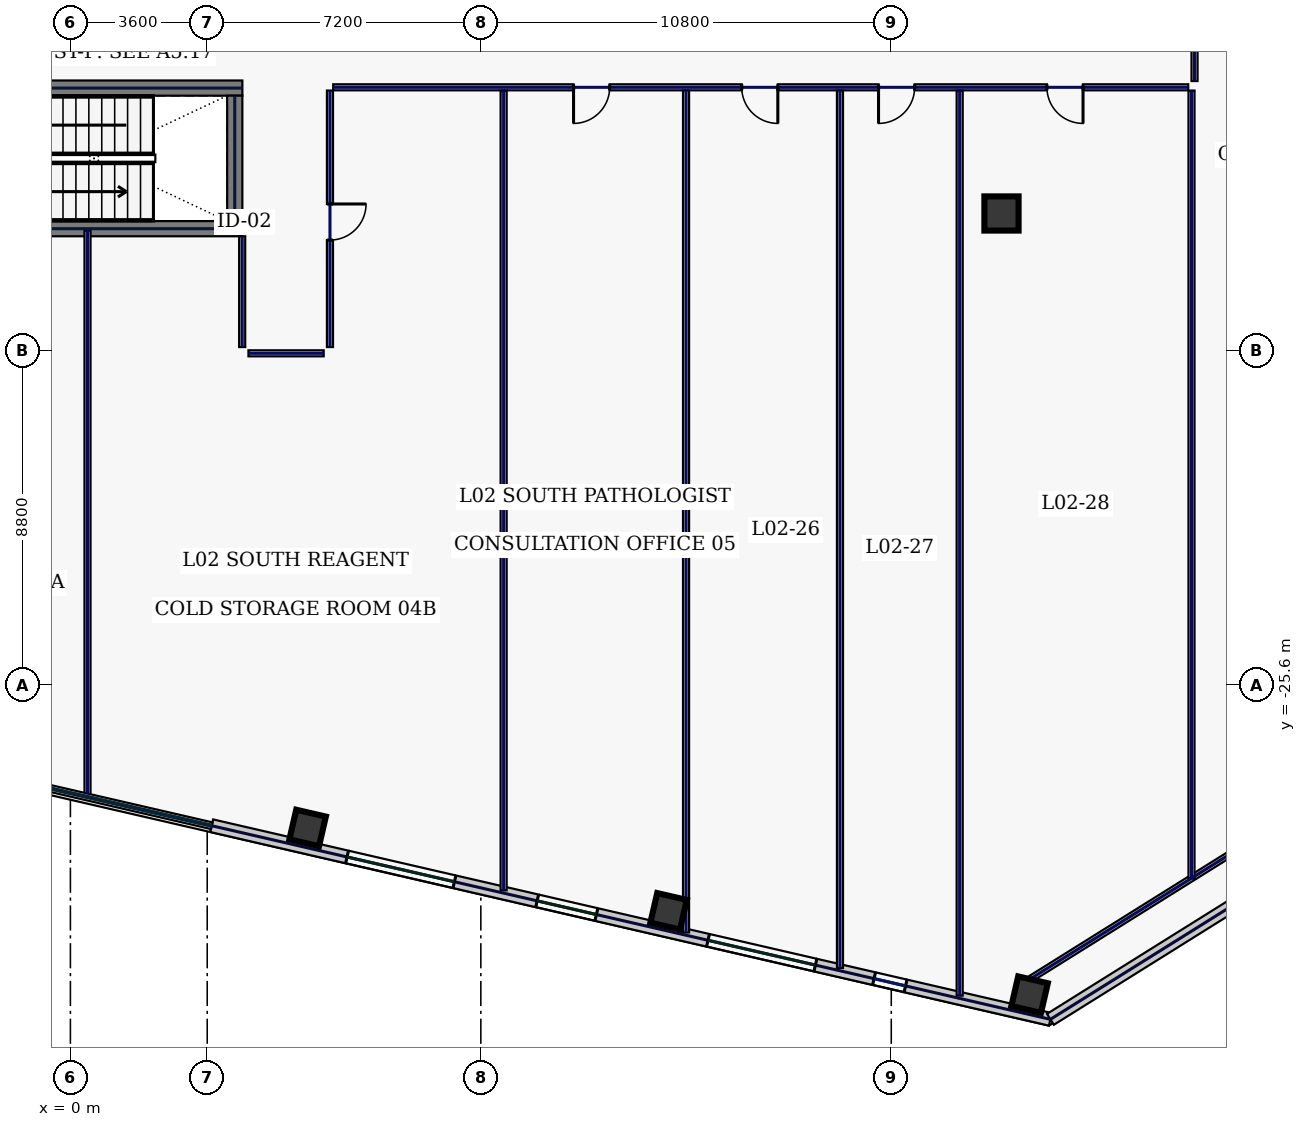
"""IFC4 building model, lengths in metres.
Left out: names, types, materials, properties, quantities, classifications, styles, units other than length and angle.
Written with IfcOpenShell. Run it as: python <this file> out.ifc"""

import sys

from ifc_helpers import new_model, si_unit, direction, frame, frame_2d, origin, origin_2d, place, context, subcontext, project, spatial, rectangle, hollow_rectangle, extrude, element, fill, save


model = new_model("IFC4")
c1 = context("Model", 3, precision=1e-05, world=origin(), true_north=direction((0.0, 1.0)))
c2 = subcontext(c1, "Body", "Model", "MODEL_VIEW")
j1 = project(units=[si_unit("LENGTHUNIT", "METRE"), si_unit("PLANEANGLEUNIT", "RADIAN")], contexts=[c1])
p1 = place(None, origin())
s1 = spatial("IfcSite", under=j1, at=p1, CompositionType="ELEMENT")
p2 = place(p1, origin())
s2 = spatial("IfcBuilding", under=s1, at=p2, CompositionType="ELEMENT")
p3 = place(p2, frame((0.0, 0.0, 13.4)))
s3 = spatial("IfcBuildingStorey", under=s2, at=p3, CompositionType="ELEMENT", Elevation=13.4)
p4 = place(p3, frame((-4.525, -13.6, 0.0), z_axis=(0.0, 0.0, 1.0), x_axis=(1.0, 0.0, 0.0)))
e1 = element("IfcWall", 1, at=p4, inside=s3, PredefinedType="SHEAR", context=c2, shape_type="SweptSolid", body=[
    extrude(rectangle(XDim=9.05, YDim=0.4, at=frame_2d((4.525, 0.0))), origin(), (0.0, 0.0, 1.0), 4.7),
])
p5 = place(p3, frame((-4.525, -9.9, 0.0), z_axis=(0.0, 0.0, 1.0), x_axis=(1.0, 0.0, 0.0)))
e2 = element("IfcWall", 2, at=p5, inside=s3, PredefinedType="SHEAR", context=c2, shape_type="SweptSolid", body=[
    extrude(rectangle(XDim=9.05, YDim=0.4, at=frame_2d((4.525, 0.0))), origin(), (0.0, 0.0, 1.0), 4.7),
])
p6 = place(p5, frame((0.25, 0.0, 0.0)))
e3 = element("IfcOpeningElement", 3, at=p6, cuts=e2, PredefinedType="OPENING", context=c2, shape_type="SweptSolid", body=[
    extrude(rectangle(XDim=1.1, YDim=2.2, at=frame_2d((0.55, 1.1))), frame((0.0, 0.21, 0.0), z_axis=(0.0, -1.0, 0.0), x_axis=(1.0, 0.0, 0.0)), (0.0, 0.0, 1.0), 0.42),
])
p7 = place(p3, frame((4.325, -13.4, 0.0), z_axis=(0.0, 0.0, 1.0), x_axis=(0.0, 1.0, 0.0)))
e4 = element("IfcWall", 4, at=p7, inside=s3, PredefinedType="SHEAR", context=c2, shape_type="SweptSolid", body=[
    extrude(rectangle(XDim=3.3, YDim=0.4, at=frame_2d((1.65, 0.0))), origin(), (0.0, 0.0, 1.0), 4.7),
])
p8 = place(p3, frame((24.5, -13.2, 0.0), z_axis=(0.0, 0.0, 1.0), x_axis=(1.0, 0.0, 0.0)))
e5 = element("IfcColumn", 5, at=p8, inside=s3, PredefinedType="COLUMN", context=c2, shape_type="SweptSolid", body=[
    extrude(hollow_rectangle(XDim=0.9, YDim=0.9, WallThickness=0.04, at=origin_2d()), origin(), (0.0, 0.0, 1.0), 4.7),
])
for number, where, z_axis, x_axis in (
    (6, (6.242, -29.371, 0.0), (0.0, 0.0, 1.0), (0.974, -0.225, 0.0)),
    (7, (15.741, -31.564, 0.0), (0.0, 0.0, 1.0), (0.974, -0.225, 0.0)),
    (8, (25.24, -33.757, 0.0), (0.0, 0.0, 1.0), (0.974, -0.225, 0.0)),
):
    element("IfcColumn", number, at=place(p3, frame(where, z_axis=z_axis, x_axis=x_axis)), inside=s3, PredefinedType="COLUMN", context=c2, shape_type="SweptSolid", body=[
        extrude(hollow_rectangle(XDim=0.8, YDim=0.8, WallThickness=0.036, at=origin_2d()), origin(), (0.0, 0.0, 1.0), 4.7),
    ])
p9 = place(p3, frame((3.717, -29.311, 0.0), z_axis=(0.0, 0.0, 1.0), x_axis=(0.97436993772, -0.224951604723, 0.0)))
e9 = element("IfcWall", 9, at=p9, inside=s3, PredefinedType="STANDARD", context=c2, shape_type="SweptSolid", body=[
    extrude(rectangle(XDim=22.651, YDim=0.34, at=frame_2d((11.326, 0.0))), origin(), (0.0, 0.0, 1.0), 4.7),
])
p10 = place(p9, frame((3.656, 0.0, 0.85)))
e10 = element("IfcOpeningElement", 10, at=p10, cuts=e9, PredefinedType="OPENING", context=c2, shape_type="SweptSolid", body=[
    extrude(rectangle(XDim=2.9, YDim=2.3, at=frame_2d((1.45, 1.15))), frame((0.0, 0.18, 0.0), z_axis=(0.0, -1.0, 0.0), x_axis=(1.0, 0.0, 0.0)), (0.0, 0.0, 1.0), 0.36),
])
p11 = place(p9, frame((8.791, 0.0, 0.22)))
e11 = element("IfcOpeningElement", 11, at=p11, cuts=e9, PredefinedType="OPENING", context=c2, shape_type="SweptSolid", body=[
    extrude(rectangle(XDim=1.6, YDim=1.2, at=frame_2d((0.8, 0.6))), frame((0.0, 0.18, 0.0), z_axis=(0.0, -1.0, 0.0), x_axis=(1.0, 0.0, 0.0)), (0.0, 0.0, 1.0), 0.36),
])
p12 = place(p9, frame((13.405, 0.0, 0.85)))
e12 = element("IfcOpeningElement", 12, at=p12, cuts=e9, PredefinedType="OPENING", context=c2, shape_type="SweptSolid", body=[
    extrude(rectangle(XDim=2.9, YDim=2.3, at=frame_2d((1.45, 1.15))), frame((0.0, 0.18, 0.0), z_axis=(0.0, -1.0, 0.0), x_axis=(1.0, 0.0, 0.0)), (0.0, 0.0, 1.0), 0.36),
])
p13 = place(p9, frame((17.889, 0.0, 0.85)))
e13 = element("IfcOpeningElement", 13, at=p13, cuts=e9, PredefinedType="OPENING", context=c2, shape_type="SweptSolid", body=[
    extrude(rectangle(XDim=0.85, YDim=1.85, at=frame_2d((0.425, 0.925))), frame((0.0, 0.18, 0.0), z_axis=(0.0, -1.0, 0.0), x_axis=(1.0, 0.0, 0.0)), (0.0, 0.0, 1.0), 0.36),
])
p14 = place(p3, frame((25.788, -34.406, 0.0), z_axis=(0.0, 0.0, 1.0), x_axis=(0.848046504656, 0.529921811158, 0.0)))
e14 = element("IfcWall", 14, at=p14, inside=s3, PredefinedType="STANDARD", context=c2, shape_type="SweptSolid", body=[
    extrude(rectangle(XDim=7.113, YDim=0.34, at=frame_2d((3.557, 0.0))), origin(), (0.0, 0.0, 1.0), 4.7),
])
p15 = place(p3, frame((25.06, -33.468, 0.0), z_axis=(0.0, 0.0, 1.0), x_axis=(0.848043064089, 0.529927317139, 0.0)))
e15 = element("IfcWall", 15, at=p15, inside=s3, PredefinedType="PARTITIONING", context=c2, shape_type="SweptSolid", body=[
    extrude(rectangle(XDim=7.354, YDim=0.16, at=frame_2d((3.677, 0.0))), origin(), (0.0, 0.0, 1.0), 4.7),
])
p16 = place(p3, frame((29.58, 9.715, 0.0), z_axis=(0.0, 0.0, 1.0), x_axis=(0.0, -1.0, 0.0)))
e16 = element("IfcWall", 16, at=p16, inside=s3, PredefinedType="PARTITIONING", context=c2, shape_type="SweptSolid", body=[
    extrude(rectangle(XDim=19.43, YDim=0.16, at=frame_2d((9.715, 0.0))), origin(), (0.0, 0.0, 1.0), 4.7),
])
p17 = place(p16, frame((16.631, 0.0, 0.0)))
e17 = element("IfcOpeningElement", 17, at=p17, cuts=e16, PredefinedType="OPENING", context=c2, shape_type="SweptSolid", body=[
    extrude(rectangle(XDim=0.95, YDim=2.2, at=frame_2d((0.475, 1.1))), frame((0.0, 0.09, 0.0), z_axis=(0.0, -1.0, 0.0), x_axis=(1.0, 0.0, 0.0)), (0.0, 0.0, 1.0), 0.18),
])
p18 = place(p16, frame((11.925, 0.0, 0.0)))
e18 = element("IfcOpeningElement", 18, at=p18, cuts=e16, PredefinedType="OPENING", context=c2, shape_type="SweptSolid", body=[
    extrude(rectangle(XDim=0.95, YDim=2.2, at=frame_2d((0.475, 1.1))), frame((0.0, 0.09, 0.0), z_axis=(0.0, -1.0, 0.0), x_axis=(1.0, 0.0, 0.0)), (0.0, 0.0, 1.0), 0.18),
])
p19 = place(p16, frame((6.725, 0.0, 0.0)))
e19 = element("IfcOpeningElement", 19, at=p19, cuts=e16, PredefinedType="OPENING", context=c2, shape_type="SweptSolid", body=[
    extrude(rectangle(XDim=0.95, YDim=2.2, at=frame_2d((0.475, 1.1))), frame((0.0, 0.09, 0.0), z_axis=(0.0, -1.0, 0.0), x_axis=(1.0, 0.0, 0.0)), (0.0, 0.0, 1.0), 0.18),
])
p20 = place(p16, frame((2.019, 0.0, 0.0)))
e20 = element("IfcOpeningElement", 20, at=p20, cuts=e16, PredefinedType="OPENING", context=c2, shape_type="SweptSolid", body=[
    extrude(rectangle(XDim=0.95, YDim=2.2, at=frame_2d((0.475, 1.1))), frame((0.0, 0.09, 0.0), z_axis=(0.0, -1.0, 0.0), x_axis=(1.0, 0.0, 0.0)), (0.0, 0.0, 1.0), 0.18),
])
p21 = place(p3, frame((29.415, -9.88, 0.0), z_axis=(0.0, 0.0, 1.0), x_axis=(-1.0, 0.0, 0.0)))
e21 = element("IfcWall", 21, at=p21, inside=s3, PredefinedType="PARTITIONING", context=c2, shape_type="SweptSolid", body=[
    extrude(rectangle(XDim=22.5, YDim=0.16, at=frame_2d((11.25, 0.0))), origin(), (0.0, 0.0, 1.0), 4.7),
])
p22 = place(p21, frame((15.225, 0.0, 0.0)))
e22 = element("IfcOpeningElement", 22, at=p22, cuts=e21, PredefinedType="OPENING", context=c2, shape_type="SweptSolid", body=[
    extrude(rectangle(XDim=0.95, YDim=2.2, at=frame_2d((0.475, 1.1))), frame((0.0, 0.09, 0.0), z_axis=(0.0, -1.0, 0.0), x_axis=(1.0, 0.0, 0.0)), (0.0, 0.0, 1.0), 0.18),
])
p23 = place(p21, frame((10.8, 0.0, 0.0)))
e23 = element("IfcOpeningElement", 23, at=p23, cuts=e21, PredefinedType="OPENING", context=c2, shape_type="SweptSolid", body=[
    extrude(rectangle(XDim=0.95, YDim=2.2, at=frame_2d((0.475, 1.1))), frame((0.0, 0.09, 0.0), z_axis=(0.0, -1.0, 0.0), x_axis=(1.0, 0.0, 0.0)), (0.0, 0.0, 1.0), 0.18),
])
p24 = place(p21, frame((7.2, 0.0, 0.0)))
e24 = element("IfcOpeningElement", 24, at=p24, cuts=e21, PredefinedType="OPENING", context=c2, shape_type="SweptSolid", body=[
    extrude(rectangle(XDim=0.95, YDim=2.2, at=frame_2d((0.475, 1.1))), frame((0.0, 0.09, 0.0), z_axis=(0.0, -1.0, 0.0), x_axis=(1.0, 0.0, 0.0)), (0.0, 0.0, 1.0), 0.18),
])
p25 = place(p21, frame((2.769, 0.0, 0.0)))
e25 = element("IfcOpeningElement", 25, at=p25, cuts=e21, PredefinedType="OPENING", context=c2, shape_type="SweptSolid", body=[
    extrude(rectangle(XDim=0.95, YDim=2.2, at=frame_2d((0.475, 1.1))), frame((0.0, 0.09, 0.0), z_axis=(0.0, -1.0, 0.0), x_axis=(1.0, 0.0, 0.0)), (0.0, 0.0, 1.0), 0.18),
])
p26 = place(p3, frame((6.83, -9.965, 0.0), z_axis=(0.0, 0.0, 1.0), x_axis=(0.0, -1.0, 0.0)))
e26 = element("IfcWall", 26, at=p26, inside=s3, PredefinedType="PARTITIONING", context=c2, shape_type="SweptSolid", body=[
    extrude(rectangle(XDim=6.75, YDim=0.16, at=frame_2d((3.375, 0.0))), origin(), (0.0, 0.0, 1.0), 4.7),
])
p27 = place(p26, frame((2.985, 0.0, 0.0)))
e27 = element("IfcOpeningElement", 27, at=p27, cuts=e26, PredefinedType="OPENING", context=c2, shape_type="SweptSolid", body=[
    extrude(rectangle(XDim=0.95, YDim=2.2, at=frame_2d((0.475, 1.1))), frame((0.0, 0.09, 0.0), z_axis=(0.0, -1.0, 0.0), x_axis=(1.0, 0.0, 0.0)), (0.0, 0.0, 1.0), 0.18),
])
p28 = place(p3, frame((6.665, -16.88, 0.0), z_axis=(0.0, 0.0, 1.0), x_axis=(-1.0, 0.0, 0.0)))
e28 = element("IfcWall", 28, at=p28, inside=s3, PredefinedType="PARTITIONING", context=c2, shape_type="SweptSolid", body=[
    extrude(rectangle(XDim=1.98, YDim=0.16, at=frame_2d((0.99, 0.0))), origin(), (0.0, 0.0, 1.0), 4.7),
])
p29 = place(p3, frame((4.52, -16.715, 0.0), z_axis=(0.0, 0.0, 1.0), x_axis=(0.0, 1.0, 0.0)))
e29 = element("IfcWall", 29, at=p29, inside=s3, PredefinedType="PARTITIONING", context=c2, shape_type="SweptSolid", body=[
    extrude(rectangle(XDim=2.915, YDim=0.16, at=frame_2d((1.458, 0.0))), origin(), (0.0, 0.0, 1.0), 4.7),
])
p30 = place(p3, frame((29.5, -30.703, 0.0), z_axis=(0.0, 0.0, 1.0), x_axis=(0.0, 1.0, 0.0)))
e30 = element("IfcWall", 30, at=p30, inside=s3, PredefinedType="PARTITIONING", context=c2, shape_type="SweptSolid", body=[
    extrude(rectangle(XDim=20.738, YDim=0.16, at=frame_2d((10.369, 0.0))), origin(), (0.0, 0.0, 1.0), 4.7),
])
p31 = place(p3, frame((11.4, -31.013, 0.0), z_axis=(0.0, 0.0, 1.0), x_axis=(0.0, 1.0, 0.0)))
e31 = element("IfcWall", 31, at=p31, inside=s3, PredefinedType="PARTITIONING", context=c2, shape_type="SweptSolid", body=[
    extrude(rectangle(XDim=21.048, YDim=0.16, at=frame_2d((10.524, 0.0))), origin(), (0.0, 0.0, 1.0), 4.7),
])
p32 = place(p3, frame((16.2, -32.121, 0.0), z_axis=(0.0, 0.0, 1.0), x_axis=(0.0, 1.0, 0.0)))
e32 = element("IfcWall", 32, at=p32, inside=s3, PredefinedType="PARTITIONING", context=c2, shape_type="SweptSolid", body=[
    extrude(rectangle(XDim=22.156, YDim=0.16, at=frame_2d((11.078, 0.0))), origin(), (0.0, 0.0, 1.0), 4.7),
])
p33 = place(p3, frame((23.4, -33.783, 0.0), z_axis=(0.0, 0.0, 1.0), x_axis=(0.0, 1.0, 0.0)))
e33 = element("IfcWall", 33, at=p33, inside=s3, PredefinedType="PARTITIONING", context=c2, shape_type="SweptSolid", body=[
    extrude(rectangle(XDim=23.818, YDim=0.16, at=frame_2d((11.909, 0.0))), origin(), (0.0, 0.0, 1.0), 4.7),
])
p34 = place(p3, frame((0.45, -28.485, 0.0), z_axis=(0.0, 0.0, 1.0), x_axis=(0.0, 1.0, 0.0)))
e34 = element("IfcWall", 34, at=p34, inside=s3, PredefinedType="PARTITIONING", context=c2, shape_type="SweptSolid", body=[
    extrude(rectangle(XDim=14.845, YDim=0.16, at=frame_2d((7.423, 0.0))), origin(), (0.0, 0.0, 1.0), 4.7),
])
p35 = place(p3, frame((20.25, -33.056, 0.0), z_axis=(0.0, 0.0, 1.0), x_axis=(0.0, 1.0, 0.0)))
e35 = element("IfcWall", 35, at=p35, inside=s3, PredefinedType="PARTITIONING", context=c2, shape_type="SweptSolid", body=[
    extrude(rectangle(XDim=23.091, YDim=0.16, at=frame_2d((11.545, 0.0))), origin(), (0.0, 0.0, 1.0), 4.7),
])
p36 = place(p10, origin())
e36 = element("IfcWindow", 36, at=p36, inside=s3, PartitioningType="SINGLE_PANEL", PredefinedType="WINDOW", context=c2, shape_type="SweptSolid", body=[
    extrude(rectangle(XDim=2.9, YDim=2.3, at=frame_2d((1.45, 1.15))), frame((0.0, 0.03, 0.0), z_axis=(0.0, -1.0, 0.0), x_axis=(1.0, 0.0, 0.0)), (0.0, 0.0, 1.0), 0.06),
])
fill(e10, e36)
p37 = place(p11, origin())
e37 = element("IfcWindow", 37, at=p37, inside=s3, PartitioningType="SINGLE_PANEL", PredefinedType="WINDOW", context=c2, shape_type="SweptSolid", body=[
    extrude(rectangle(XDim=1.6, YDim=1.2, at=frame_2d((0.8, 0.6))), frame((0.0, 0.03, 0.0), z_axis=(0.0, -1.0, 0.0), x_axis=(1.0, 0.0, 0.0)), (0.0, 0.0, 1.0), 0.06),
])
fill(e11, e37)
p38 = place(p12, origin())
e38 = element("IfcWindow", 38, at=p38, inside=s3, PartitioningType="SINGLE_PANEL", PredefinedType="WINDOW", context=c2, shape_type="SweptSolid", body=[
    extrude(rectangle(XDim=2.9, YDim=2.3, at=frame_2d((1.45, 1.15))), frame((0.0, 0.03, 0.0), z_axis=(0.0, -1.0, 0.0), x_axis=(1.0, 0.0, 0.0)), (0.0, 0.0, 1.0), 0.06),
])
fill(e12, e38)
p39 = place(p13, origin())
e39 = element("IfcWindow", 39, at=p39, inside=s3, PartitioningType="SINGLE_PANEL", PredefinedType="WINDOW", context=c2, shape_type="SweptSolid", body=[
    extrude(rectangle(XDim=0.85, YDim=1.85, at=frame_2d((0.425, 0.925))), frame((0.0, 0.03, 0.0), z_axis=(0.0, -1.0, 0.0), x_axis=(1.0, 0.0, 0.0)), (0.0, 0.0, 1.0), 0.06),
])
fill(e13, e39)
p40 = place(p27, origin())
e40 = element("IfcDoor", 40, at=p40, inside=s3, OperationType="SINGLE_SWING_LEFT", PredefinedType="DOOR", context=c2, shape_type="SweptSolid", body=[
    extrude(rectangle(XDim=0.95, YDim=2.2, at=frame_2d((0.475, 1.1))), frame((0.0, 0.025, 0.0), z_axis=(0.0, -1.0, 0.0), x_axis=(1.0, 0.0, 0.0)), (0.0, 0.0, 1.0), 0.05),
])
fill(e27, e40)
p41 = place(p22, origin())
e41 = element("IfcDoor", 41, at=p41, inside=s3, OperationType="SINGLE_SWING_RIGHT", PredefinedType="DOOR", context=c2, shape_type="SweptSolid", body=[
    extrude(rectangle(XDim=0.95, YDim=2.2, at=frame_2d((0.475, 1.1))), frame((0.0, 0.025, 0.0), z_axis=(0.0, -1.0, 0.0), x_axis=(1.0, 0.0, 0.0)), (0.0, 0.0, 1.0), 0.05),
])
fill(e22, e41)
p42 = place(p23, origin())
e42 = element("IfcDoor", 42, at=p42, inside=s3, OperationType="SINGLE_SWING_LEFT", PredefinedType="DOOR", context=c2, shape_type="SweptSolid", body=[
    extrude(rectangle(XDim=0.95, YDim=2.2, at=frame_2d((0.475, 1.1))), frame((0.0, 0.025, 0.0), z_axis=(0.0, -1.0, 0.0), x_axis=(1.0, 0.0, 0.0)), (0.0, 0.0, 1.0), 0.05),
])
fill(e23, e42)
p43 = place(p24, origin())
e43 = element("IfcDoor", 43, at=p43, inside=s3, OperationType="SINGLE_SWING_RIGHT", PredefinedType="DOOR", context=c2, shape_type="SweptSolid", body=[
    extrude(rectangle(XDim=0.95, YDim=2.2, at=frame_2d((0.475, 1.1))), frame((0.0, 0.025, 0.0), z_axis=(0.0, -1.0, 0.0), x_axis=(1.0, 0.0, 0.0)), (0.0, 0.0, 1.0), 0.05),
])
fill(e24, e43)
p44 = place(p25, origin())
e44 = element("IfcDoor", 44, at=p44, inside=s3, OperationType="SINGLE_SWING_LEFT", PredefinedType="DOOR", context=c2, shape_type="SweptSolid", body=[
    extrude(rectangle(XDim=0.95, YDim=2.2, at=frame_2d((0.475, 1.1))), frame((0.0, 0.025, 0.0), z_axis=(0.0, -1.0, 0.0), x_axis=(1.0, 0.0, 0.0)), (0.0, 0.0, 1.0), 0.05),
])
fill(e25, e44)
save(model, sys.argv[1])
